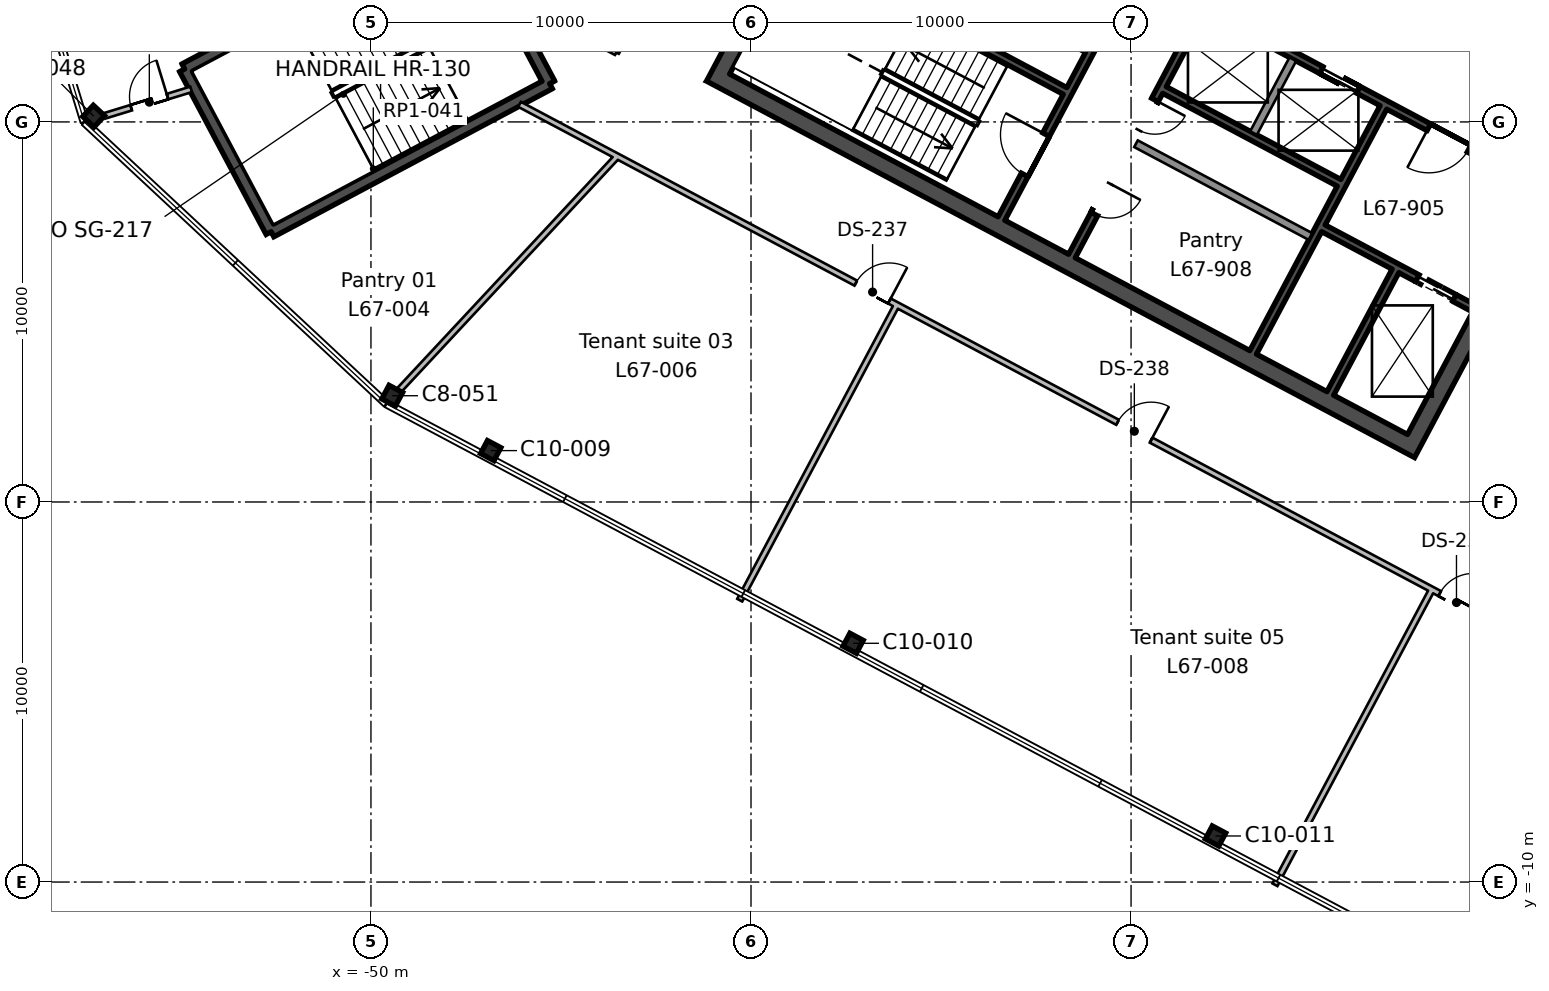
"""IFC4 building model, lengths in metres.
Left out: names, types, materials, properties, quantities, classifications, styles, units other than length and angle.
Written with IfcOpenShell. Run it as: python <this file> out.ifc"""

import sys

from ifc_helpers import new_model, si_unit, direction, frame, frame_2d, origin, origin_2d, place, context, subcontext, project, spatial, rectangle, i_section, extrude, element, fill, save


model = new_model("IFC4")
c1 = context("Model", 3, precision=1e-05, world=origin(), true_north=direction((0.0, 1.0)))
c2 = subcontext(c1, "Body", "Model", "MODEL_VIEW")
j1 = project(units=[si_unit("LENGTHUNIT", "METRE"), si_unit("PLANEANGLEUNIT", "RADIAN")], contexts=[c1])
p1 = place(None, origin())
s1 = spatial("IfcSite", under=j1, at=p1, CompositionType="ELEMENT")
p2 = place(p1, origin())
s2 = spatial("IfcBuilding", under=s1, at=p2, CompositionType="ELEMENT")
p3 = place(p2, frame((0.0, 0.0, 297.0)))
s3 = spatial("IfcBuildingStorey", under=s2, at=p3, CompositionType="ELEMENT", Elevation=297.0)
for number, where, z_axis, x_axis in (
    (1, (-27.777, -8.788, 0.0), (0.0, 0.0, 1.0), (0.883, -0.469, 0.0)),
    (2, (-37.313, -3.718, 0.0), (0.0, 0.0, 1.0), (0.883, -0.469, 0.0)),
    (3, (-46.849, 1.352, 0.0), (0.0, 0.0, 1.0), (0.883, -0.469, 0.0)),
):
    element("IfcColumn", number, at=place(p3, frame(where, z_axis=z_axis, x_axis=x_axis)), inside=s3, PredefinedType="COLUMN", context=c2, shape_type="SweptSolid", body=[
        extrude(i_section(OverallWidth=0.399, OverallDepth=0.386, WebThickness=0.021, FlangeThickness=0.033, FilletRadius=0.015, at=origin_2d()), origin(), (0.0, 0.0, 1.0), 3.9),
    ])
for number, where, z_axis, x_axis in (
    (4, (-49.441, 2.796, 0.0), (0.0, 0.0, 1.0), (0.883, -0.469, 0.0)),
    (5, (-57.296, 10.152, 0.0), (0.0, 0.0, 1.0), (0.731, -0.682, 0.0)),
):
    element("IfcColumn", number, at=place(p3, frame(where, z_axis=z_axis, x_axis=x_axis)), inside=s3, PredefinedType="COLUMN", context=c2, shape_type="SweptSolid", body=[
        extrude(i_section(OverallWidth=0.404, OverallDepth=0.406, WebThickness=0.027, FlangeThickness=0.044, FilletRadius=0.015, at=origin_2d()), origin(), (0.0, 0.0, 1.0), 3.9),
    ])
p4 = place(p3, frame((-13.771, 18.138, 0.0), z_axis=(0.0, 0.0, 1.0), x_axis=(-0.469467968382, -0.882949504028, 0.0)))
e6 = element("IfcWall", 6, at=p4, inside=s3, PredefinedType="SHEAR", context=c2, shape_type="SweptSolid", body=[
    extrude(rectangle(XDim=19.1, YDim=0.45, at=frame_2d((9.55, 0.0))), origin(), (0.0, 0.0, 1.0), 3.9),
])
p5 = place(p4, frame((6.55, 0.0, 0.0)))
e7 = element("IfcOpeningElement", 7, at=p5, cuts=e6, PredefinedType="OPENING", context=c2, shape_type="SweptSolid", body=[
    extrude(rectangle(XDim=2.4, YDim=2.4, at=frame_2d((1.2, 1.2))), frame((0.0, 0.235, 0.0), z_axis=(0.0, -1.0, 0.0), x_axis=(1.0, 0.0, 0.0)), (0.0, 0.0, 1.0), 0.47),
])
p6 = place(p3, frame((-32.004, 27.833, 0.0), z_axis=(0.0, 0.0, 1.0), x_axis=(-0.469467968382, -0.882949504028, 0.0)))
e8 = element("IfcWall", 8, at=p6, inside=s3, PredefinedType="SHEAR", context=c2, shape_type="SweptSolid", body=[
    extrude(rectangle(XDim=19.1, YDim=0.45, at=frame_2d((9.55, 0.0))), origin(), (0.0, 0.0, 1.0), 3.9),
])
p7 = place(p6, frame((10.15, 0.0, 0.0)))
e9 = element("IfcOpeningElement", 9, at=p7, cuts=e8, PredefinedType="OPENING", context=c2, shape_type="SweptSolid", body=[
    extrude(rectangle(XDim=2.4, YDim=2.4, at=frame_2d((1.2, 1.2))), frame((0.0, 0.235, 0.0), z_axis=(0.0, -1.0, 0.0), x_axis=(1.0, 0.0, 0.0)), (0.0, 0.0, 1.0), 0.47),
])
p8 = place(p3, frame((-22.832, 1.578, 0.0), z_axis=(0.0, 0.0, 1.0), x_axis=(-0.88294509198, 0.469476266226, 0.0)))
e10 = element("IfcWall", 10, at=p8, inside=s3, PredefinedType="SHEAR", context=c2, shape_type="SweptSolid", body=[
    extrude(rectangle(XDim=20.2, YDim=0.45, at=frame_2d((10.1, 0.0))), origin(), (0.0, 0.0, 1.0), 3.9),
])
p9 = place(p3, frame((-23.043, 6.08, 0.0), z_axis=(0.0, 0.0, 1.0), x_axis=(-0.469494272526, -0.882935517501, 0.0)))
e11 = element("IfcWall", 11, at=p9, inside=s3, PredefinedType="SHEAR", context=c2, shape_type="SweptSolid", body=[
    extrude(rectangle(XDim=3.65, YDim=0.2, at=frame_2d((1.825, 0.0))), origin(), (0.0, 0.0, 1.0), 3.9),
])
p10 = place(p3, frame((-23.36, 10.382, 0.0), z_axis=(0.0, 0.0, 1.0), x_axis=(-0.469480409012, -0.88294288918, 0.0)))
e12 = element("IfcWall", 12, at=p10, inside=s3, PredefinedType="SHEAR", context=c2, shape_type="SweptSolid", body=[
    extrude(rectangle(XDim=7.3, YDim=0.2, at=frame_2d((3.65, 0.0))), origin(), (0.0, 0.0, 1.0), 3.9),
])
p11 = place(p3, frame((-25.744, 11.65, 0.0), z_axis=(0.0, 0.0, 1.0), x_axis=(-0.469487830541, -0.882938942948, 0.0)))
e13 = element("IfcWall", 13, at=p11, inside=s3, PredefinedType="SOLIDWALL", context=c2, shape_type="SweptSolid", body=[
    extrude(rectangle(XDim=2.2, YDim=0.2, at=frame_2d((1.1, 0.0))), origin(), (0.0, 0.0, 1.0), 3.9),
])
p12 = place(p3, frame((-28.128, 12.917, 0.0), z_axis=(0.0, 0.0, 1.0), x_axis=(-0.469454336211, -0.882956752176, 0.0)))
e14 = element("IfcWall", 14, at=p12, inside=s3, PredefinedType="SHEAR", context=c2, shape_type="SweptSolid", body=[
    extrude(rectangle(XDim=7.3, YDim=0.2, at=frame_2d((3.65, 0.0))), origin(), (0.0, 0.0, 1.0), 3.9),
])
p13 = place(p12, frame((2.65, 0.0, 0.0)))
e15 = element("IfcOpeningElement", 15, at=p13, cuts=e14, PredefinedType="OPENING", context=c2, shape_type="SweptSolid", body=[
    extrude(rectangle(XDim=0.9, YDim=2.1, at=frame_2d((0.45, 1.05))), frame((0.0, 0.11, 0.0), z_axis=(0.0, -1.0, 0.0), x_axis=(1.0, 0.0, 0.0)), (0.0, 0.0, 1.0), 0.22),
])
p14 = place(p12, frame((5.15, 0.0, 0.0)))
e16 = element("IfcOpeningElement", 16, at=p14, cuts=e14, PredefinedType="OPENING", context=c2, shape_type="SweptSolid", body=[
    extrude(rectangle(XDim=0.9, YDim=2.1, at=frame_2d((0.45, 1.05))), frame((0.0, 0.11, 0.0), z_axis=(0.0, -1.0, 0.0), x_axis=(1.0, 0.0, 0.0)), (0.0, 0.0, 1.0), 0.22),
])
p15 = place(p3, frame((-29.982, 13.903, 0.0), z_axis=(0.0, 0.0, 1.0), x_axis=(-0.469454336211, -0.882956752176, 0.0)))
e17 = element("IfcWall", 17, at=p15, inside=s3, PredefinedType="SHEAR", context=c2, shape_type="SweptSolid", body=[
    extrude(rectangle(XDim=7.3, YDim=0.2, at=frame_2d((3.65, 0.0))), origin(), (0.0, 0.0, 1.0), 3.9),
])
p16 = place(p15, frame((4.8, 0.0, 0.0)))
e18 = element("IfcOpeningElement", 18, at=p16, cuts=e17, PredefinedType="OPENING", context=c2, shape_type="SweptSolid", body=[
    extrude(rectangle(XDim=1.2, YDim=2.1, at=frame_2d((0.6, 1.05))), frame((0.0, 0.11, 0.0), z_axis=(0.0, -1.0, 0.0), x_axis=(1.0, 0.0, 0.0)), (0.0, 0.0, 1.0), 0.22),
])
p17 = place(p3, frame((-19.252, 8.311, 0.0), z_axis=(0.0, 0.0, 1.0), x_axis=(-0.882955722218, 0.469456273365, 0.0)))
e19 = element("IfcWall", 19, at=p17, inside=s3, PredefinedType="SHEAR", context=c2, shape_type="SweptSolid", body=[
    extrude(rectangle(XDim=10.0, YDim=0.2, at=frame_2d((5.0, 0.0))), origin(), (0.0, 0.0, 1.0), 3.9),
])
p18 = place(p17, frame((2.1, 0.0, 0.0)))
e20 = element("IfcOpeningElement", 20, at=p18, cuts=e19, PredefinedType="OPENING", context=c2, shape_type="SweptSolid", body=[
    extrude(rectangle(XDim=1.2, YDim=2.1, at=frame_2d((0.6, 1.05))), frame((0.0, 0.11, 0.0), z_axis=(0.0, -1.0, 0.0), x_axis=(1.0, 0.0, 0.0)), (0.0, 0.0, 1.0), 0.22),
])
p19 = place(p17, frame((5.4, 0.0, 0.0)))
e21 = element("IfcOpeningElement", 21, at=p19, cuts=e19, PredefinedType="OPENING", context=c2, shape_type="SweptSolid", body=[
    extrude(rectangle(XDim=1.1, YDim=2.1, at=frame_2d((0.55, 1.05))), frame((0.0, 0.11, 0.0), z_axis=(0.0, -1.0, 0.0), x_axis=(1.0, 0.0, 0.0)), (0.0, 0.0, 1.0), 0.22),
])
p20 = place(p17, frame((8.1, 0.0, 0.0)))
e22 = element("IfcOpeningElement", 22, at=p20, cuts=e19, PredefinedType="OPENING", context=c2, shape_type="SweptSolid", body=[
    extrude(rectangle(XDim=1.1, YDim=2.1, at=frame_2d((0.55, 1.05))), frame((0.0, 0.11, 0.0), z_axis=(0.0, -1.0, 0.0), x_axis=(1.0, 0.0, 0.0)), (0.0, 0.0, 1.0), 0.22),
])
p21 = place(p3, frame((-24.528, 8.398, 0.0), z_axis=(0.0, 0.0, 1.0), x_axis=(-0.882953967957, 0.469459572775, 0.0)))
e23 = element("IfcWall", 23, at=p21, inside=s3, PredefinedType="SHEAR", context=c2, shape_type="SweptSolid", body=[
    extrude(rectangle(XDim=5.2, YDim=0.2, at=frame_2d((2.6, 0.0))), origin(), (0.0, 0.0, 1.0), 3.9),
])
p22 = place(p3, frame((-31.15, 11.919, 0.0), z_axis=(0.0, 0.0, 1.0), x_axis=(-0.882940221191, 0.469485426614, 0.0)))
e24 = element("IfcWall", 24, at=p22, inside=s3, PredefinedType="SHEAR", context=c2, shape_type="SweptSolid", body=[
    extrude(rectangle(XDim=8.0, YDim=0.2, at=frame_2d((4.0, 0.0))), origin(), (0.0, 0.0, 1.0), 3.9),
])
p23 = place(p3, frame((-20.965, 5.088, 0.0), z_axis=(0.0, 0.0, 1.0), x_axis=(-0.882925986334, 0.469512196493, 0.0)))
e25 = element("IfcWall", 25, at=p23, inside=s3, PredefinedType="SHEAR", context=c2, shape_type="SweptSolid", body=[
    extrude(rectangle(XDim=4.5, YDim=0.2, at=frame_2d((2.25, 0.0))), origin(), (0.0, 0.0, 1.0), 3.9),
])
p24 = place(p23, frame((0.6, 0.0, 0.0)))
e26 = element("IfcOpeningElement", 26, at=p24, cuts=e25, PredefinedType="OPENING", context=c2, shape_type="SweptSolid", body=[
    extrude(rectangle(XDim=1.1, YDim=2.1, at=frame_2d((0.55, 1.05))), frame((0.0, 0.11, 0.0), z_axis=(0.0, -1.0, 0.0), x_axis=(1.0, 0.0, 0.0)), (0.0, 0.0, 1.0), 0.22),
])
p25 = place(p3, frame((-31.737, 10.816, 0.0), z_axis=(0.0, 0.0, 1.0), x_axis=(-0.882940221191, 0.469485426614, 0.0)))
e27 = element("IfcWall", 27, at=p25, inside=s3, PredefinedType="SHEAR", context=c2, shape_type="SweptSolid", body=[
    extrude(rectangle(XDim=8.0, YDim=0.2, at=frame_2d((4.0, 0.0))), origin(), (0.0, 0.0, 1.0), 3.9),
])
p26 = place(p3, frame((-25.28, 6.986, 0.0), z_axis=(0.0, 0.0, 1.0), x_axis=(-0.882934506056, 0.469496174655, 0.0)))
e28 = element("IfcWall", 28, at=p26, inside=s3, PredefinedType="SOLIDWALL", context=c2, shape_type="SweptSolid", body=[
    extrude(rectangle(XDim=5.2, YDim=0.2, at=frame_2d((2.6, 0.0))), origin(), (0.0, 0.0, 1.0), 3.9),
])
p27 = place(p3, frame((-47.574, 15.29, 0.0), z_axis=(0.0, 0.0, 1.0), x_axis=(0.469443498566, -0.882962514297, 0.0)))
e29 = element("IfcWall", 29, at=p27, inside=s3, PredefinedType="SHEAR", context=c2, shape_type="SweptSolid", body=[
    extrude(rectangle(XDim=4.85, YDim=0.3, at=frame_2d((2.425, 0.0))), origin(), (0.0, 0.0, 1.0), 3.9),
])
p28 = place(p3, frame((-45.297, 11.007, 0.0), z_axis=(0.0, 0.0, 1.0), x_axis=(-0.882951519127, -0.469464178475, 0.0)))
e30 = element("IfcWall", 30, at=p28, inside=s3, PredefinedType="SHEAR", context=c2, shape_type="SweptSolid", body=[
    extrude(rectangle(XDim=8.3, YDim=0.3, at=frame_2d((4.15, 0.0))), origin(), (0.0, 0.0, 1.0), 3.9),
])
p29 = place(p3, frame((-52.626, 7.111, 0.0), z_axis=(0.0, 0.0, 1.0), x_axis=(-0.469464364128, 0.882951420416, 0.0)))
e31 = element("IfcWall", 31, at=p29, inside=s3, PredefinedType="SHEAR", context=c2, shape_type="SweptSolid", body=[
    extrude(rectangle(XDim=4.85, YDim=0.3, at=frame_2d((2.425, 0.0))), origin(), (0.0, 0.0, 1.0), 3.9),
])
p30 = place(p3, frame((-54.903, 11.393, 0.0), z_axis=(0.0, 0.0, 1.0), x_axis=(0.882939326045, 0.469487110071, 0.0)))
e32 = element("IfcWall", 32, at=p30, inside=s3, PredefinedType="SHEAR", context=c2, shape_type="SweptSolid", body=[
    extrude(rectangle(XDim=8.3, YDim=0.3, at=frame_2d((4.15, 0.0))), origin(), (0.0, 0.0, 1.0), 3.9),
])
p31 = place(p30, frame((6.05, 0.0, 0.0)))
e33 = element("IfcOpeningElement", 33, at=p31, cuts=e32, PredefinedType="OPENING", context=c2, shape_type="SweptSolid", body=[
    extrude(rectangle(XDim=1.9, YDim=2.1, at=frame_2d((0.95, 1.05))), frame((0.0, 0.16, 0.0), z_axis=(0.0, -1.0, 0.0), x_axis=(1.0, 0.0, 0.0)), (0.0, 0.0, 1.0), 0.32),
])
p32 = place(p3, frame((-54.732, 10.857, 0.0), z_axis=(0.0, 0.0, 1.0), x_axis=(-0.956231519395, -0.292611143525, 0.0)))
e34 = element("IfcWall", 34, at=p32, inside=s3, PredefinedType="PARTITIONING", context=c2, shape_type="SweptSolid", body=[
    extrude(rectangle(XDim=2.385, YDim=0.15, at=frame_2d((1.193, 0.0))), origin(), (0.0, 0.0, 1.0), 3.54),
])
p33 = place(p32, frame((0.65, 0.0, 0.0)))
e35 = element("IfcOpeningElement", 35, at=p33, cuts=e34, PredefinedType="OPENING", context=c2, shape_type="SweptSolid", body=[
    extrude(rectangle(XDim=1.0, YDim=2.1, at=frame_2d((0.5, 1.05))), frame((0.0, 0.085, 0.0), z_axis=(0.0, -1.0, 0.0), x_axis=(1.0, 0.0, 0.0)), (0.0, 0.0, 1.0), 0.17),
])
p34 = place(p3, frame((-43.519, 9.096, 0.0), z_axis=(0.0, 0.0, 1.0), x_axis=(-0.682006444307, -0.731346162856, 0.0)))
e36 = element("IfcWall", 36, at=p34, inside=s3, PredefinedType="PARTITIONING", context=c2, shape_type="SweptSolid", body=[
    extrude(rectangle(XDim=8.427, YDim=0.15, at=frame_2d((4.213, 0.0))), origin(), (0.0, 0.0, 1.0), 3.54),
])
p35 = place(p3, frame((-36.166, 5.186, 0.0), z_axis=(0.0, 0.0, 1.0), x_axis=(-0.469445946219, -0.882961212952, 0.0)))
e37 = element("IfcWall", 37, at=p35, inside=s3, PredefinedType="PARTITIONING", context=c2, shape_type="SweptSolid", body=[
    extrude(rectangle(XDim=8.8, YDim=0.15, at=frame_2d((4.4, 0.0))), origin(), (0.0, 0.0, 1.0), 3.54),
])
p36 = place(p3, frame((-34.155, 29.486, 0.0), z_axis=(0.0, 0.0, 1.0), x_axis=(-0.469446756585, -0.882960782103, 0.0)))
e38 = element("IfcWall", 38, at=p36, inside=s3, PredefinedType="PARTITIONING", context=c2, shape_type="SweptSolid", body=[
    extrude(rectangle(XDim=20.0, YDim=0.15, at=frame_2d((10.0, 0.0))), origin(), (0.0, 0.0, 1.0), 3.54),
])
p37 = place(p3, frame((-43.544, 11.827, 0.0), z_axis=(0.0, 0.0, 1.0), x_axis=(-0.882974130461, 0.469421649411, 0.0)))
e39 = element("IfcWall", 39, at=p37, inside=s3, PredefinedType="PARTITIONING", context=c2, shape_type="SweptSolid", body=[
    extrude(rectangle(XDim=3.238, YDim=0.15, at=frame_2d((1.619, 0.0))), origin(), (0.0, 0.0, 1.0), 3.54),
])
p38 = place(p3, frame((-13.8, -6.706, 0.0), z_axis=(0.0, 0.0, 1.0), x_axis=(-0.882947286887, 0.469472138235, 0.0)))
e40 = element("IfcWall", 40, at=p38, inside=s3, PredefinedType="PARTITIONING", context=c2, shape_type="SweptSolid", body=[
    extrude(rectangle(XDim=36.571, YDim=0.15, at=frame_2d((18.285, 0.0))), origin(), (0.0, 0.0, 1.0), 3.54),
])
p39 = place(p38, frame((25.55, 0.0, 0.0)))
e41 = element("IfcOpeningElement", 41, at=p39, cuts=e40, PredefinedType="OPENING", context=c2, shape_type="SweptSolid", body=[
    extrude(rectangle(XDim=1.0, YDim=2.1, at=frame_2d((0.5, 1.05))), frame((0.0, 0.085, 0.0), z_axis=(0.0, -1.0, 0.0), x_axis=(1.0, 0.0, 0.0)), (0.0, 0.0, 1.0), 0.17),
])
p40 = place(p38, frame((17.75, 0.0, 0.0)))
e42 = element("IfcOpeningElement", 42, at=p40, cuts=e40, PredefinedType="OPENING", context=c2, shape_type="SweptSolid", body=[
    extrude(rectangle(XDim=1.0, YDim=2.1, at=frame_2d((0.5, 1.05))), frame((0.0, 0.085, 0.0), z_axis=(0.0, -1.0, 0.0), x_axis=(1.0, 0.0, 0.0)), (0.0, 0.0, 1.0), 0.17),
])
p41 = place(p38, frame((8.15, 0.0, 0.0)))
e43 = element("IfcOpeningElement", 43, at=p41, cuts=e40, PredefinedType="OPENING", context=c2, shape_type="SweptSolid", body=[
    extrude(rectangle(XDim=1.0, YDim=2.1, at=frame_2d((0.5, 1.05))), frame((0.0, 0.085, 0.0), z_axis=(0.0, -1.0, 0.0), x_axis=(1.0, 0.0, 0.0)), (0.0, 0.0, 1.0), 0.17),
])
p42 = place(p3, frame((-22.083, -2.302, 0.0), z_axis=(0.0, 0.0, 1.0), x_axis=(-0.469445946219, -0.882961212952, 0.0)))
e44 = element("IfcWall", 44, at=p42, inside=s3, PredefinedType="PARTITIONING", context=c2, shape_type="SweptSolid", body=[
    extrude(rectangle(XDim=8.8, YDim=0.15, at=frame_2d((4.4, 0.0))), origin(), (0.0, 0.0, 1.0), 3.54),
])
p43 = place(p18, origin())
e45 = element("IfcDoor", 45, at=p43, inside=s3, OperationType="SINGLE_SWING_RIGHT", PredefinedType="DOOR", context=c2, shape_type="SweptSolid", body=[
    extrude(rectangle(XDim=1.2, YDim=2.1, at=frame_2d((0.6, 1.05))), frame((0.0, 0.025, 0.0), z_axis=(0.0, -1.0, 0.0), x_axis=(1.0, 0.0, 0.0)), (0.0, 0.0, 1.0), 0.05),
])
fill(e20, e45)
p44 = place(p16, frame((1.2, 0.0, 0.0), z_axis=(0.0, 0.0, 1.0), x_axis=(-1.0, 0.0, 0.0)))
e46 = element("IfcDoor", 46, at=p44, inside=s3, OperationType="SINGLE_SWING_RIGHT", PredefinedType="DOOR", context=c2, shape_type="SweptSolid", body=[
    extrude(rectangle(XDim=1.2, YDim=2.1, at=frame_2d((0.6, 1.05))), frame((0.0, 0.025, 0.0), z_axis=(0.0, -1.0, 0.0), x_axis=(1.0, 0.0, 0.0)), (0.0, 0.0, 1.0), 0.05),
])
fill(e18, e46)
p45 = place(p19, origin())
e47 = element("IfcDoor", 47, at=p45, inside=s3, OperationType="DOUBLE_DOOR_SLIDING", PredefinedType="DOOR", context=c2, shape_type="SweptSolid", body=[
    extrude(rectangle(XDim=1.1, YDim=2.1, at=frame_2d((0.55, 1.05))), frame((0.0, 0.025, 0.0), z_axis=(0.0, -1.0, 0.0), x_axis=(1.0, 0.0, 0.0)), (0.0, 0.0, 1.0), 0.05),
])
fill(e21, e47)
p46 = place(p24, origin())
e48 = element("IfcDoor", 48, at=p46, inside=s3, OperationType="DOUBLE_DOOR_SLIDING", PredefinedType="DOOR", context=c2, shape_type="SweptSolid", body=[
    extrude(rectangle(XDim=1.1, YDim=2.1, at=frame_2d((0.55, 1.05))), frame((0.0, 0.025, 0.0), z_axis=(0.0, -1.0, 0.0), x_axis=(1.0, 0.0, 0.0)), (0.0, 0.0, 1.0), 0.05),
])
fill(e26, e48)
p47 = place(p13, origin())
e49 = element("IfcDoor", 49, at=p47, inside=s3, OperationType="SINGLE_SWING_LEFT", PredefinedType="DOOR", context=c2, shape_type="SweptSolid", body=[
    extrude(rectangle(XDim=0.9, YDim=2.1, at=frame_2d((0.45, 1.05))), frame((0.0, 0.025, 0.0), z_axis=(0.0, -1.0, 0.0), x_axis=(1.0, 0.0, 0.0)), (0.0, 0.0, 1.0), 0.05),
])
fill(e15, e49)
p48 = place(p14, origin())
e50 = element("IfcDoor", 50, at=p48, inside=s3, OperationType="SINGLE_SWING_LEFT", PredefinedType="DOOR", context=c2, shape_type="SweptSolid", body=[
    extrude(rectangle(XDim=0.9, YDim=2.1, at=frame_2d((0.45, 1.05))), frame((0.0, 0.025, 0.0), z_axis=(0.0, -1.0, 0.0), x_axis=(1.0, 0.0, 0.0)), (0.0, 0.0, 1.0), 0.05),
])
fill(e16, e50)
p49 = place(p33, frame((1.0, 0.0, 0.0), z_axis=(0.0, 0.0, 1.0), x_axis=(-1.0, 0.0, 0.0)))
e51 = element("IfcDoor", 51, at=p49, inside=s3, OperationType="SINGLE_SWING_RIGHT", PredefinedType="DOOR", context=c2, shape_type="SweptSolid", body=[
    extrude(rectangle(XDim=1.0, YDim=2.1, at=frame_2d((0.5, 1.05))), frame((0.0, 0.025, 0.0), z_axis=(0.0, -1.0, 0.0), x_axis=(1.0, 0.0, 0.0)), (0.0, 0.0, 1.0), 0.05),
])
fill(e35, e51)
p50 = place(p39, frame((1.0, 0.0, 0.0), z_axis=(0.0, 0.0, 1.0), x_axis=(-1.0, 0.0, 0.0)))
e52 = element("IfcDoor", 52, at=p50, inside=s3, OperationType="SINGLE_SWING_RIGHT", PredefinedType="DOOR", context=c2, shape_type="SweptSolid", body=[
    extrude(rectangle(XDim=1.0, YDim=2.1, at=frame_2d((0.5, 1.05))), frame((0.0, 0.025, 0.0), z_axis=(0.0, -1.0, 0.0), x_axis=(1.0, 0.0, 0.0)), (0.0, 0.0, 1.0), 0.05),
])
fill(e41, e52)
p51 = place(p40, frame((1.0, 0.0, 0.0), z_axis=(0.0, 0.0, 1.0), x_axis=(-1.0, 0.0, 0.0)))
e53 = element("IfcDoor", 53, at=p51, inside=s3, OperationType="SINGLE_SWING_RIGHT", PredefinedType="DOOR", context=c2, shape_type="SweptSolid", body=[
    extrude(rectangle(XDim=1.0, YDim=2.1, at=frame_2d((0.5, 1.05))), frame((0.0, 0.025, 0.0), z_axis=(0.0, -1.0, 0.0), x_axis=(1.0, 0.0, 0.0)), (0.0, 0.0, 1.0), 0.05),
])
fill(e42, e53)
p52 = place(p41, frame((1.0, 0.0, 0.0), z_axis=(0.0, 0.0, 1.0), x_axis=(-1.0, 0.0, 0.0)))
e54 = element("IfcDoor", 54, at=p52, inside=s3, OperationType="SINGLE_SWING_RIGHT", PredefinedType="DOOR", context=c2, shape_type="SweptSolid", body=[
    extrude(rectangle(XDim=1.0, YDim=2.1, at=frame_2d((0.5, 1.05))), frame((0.0, 0.025, 0.0), z_axis=(0.0, -1.0, 0.0), x_axis=(1.0, 0.0, 0.0)), (0.0, 0.0, 1.0), 0.05),
])
fill(e43, e54)
save(model, sys.argv[1])
